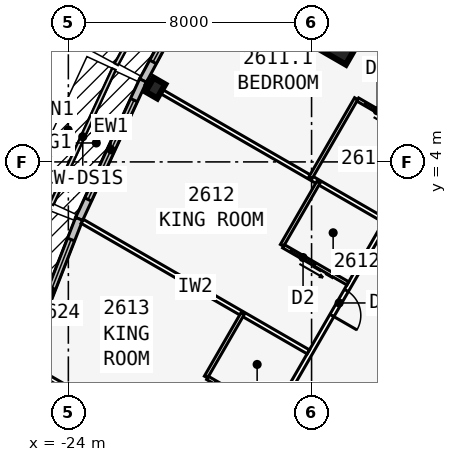
"""IFC4 building model, lengths in metres.
Left out: names, types, materials, properties, quantities, classifications, styles, units other than length and angle.
Written with IfcOpenShell. Run it as: python <this file> out.ifc"""

import sys

from ifc_helpers import new_model, si_unit, direction, frame, frame_2d, origin, origin_2d, place, context, subcontext, project, spatial, rectangle, i_section, extrude, element, fill, save


model = new_model("IFC4")
c1 = context("Model", 3, precision=1e-05, world=origin(), true_north=direction((0.0, 1.0)))
c2 = subcontext(c1, "Body", "Model", "MODEL_VIEW")
j1 = project(units=[si_unit("LENGTHUNIT", "METRE"), si_unit("PLANEANGLEUNIT", "RADIAN")], contexts=[c1])
p1 = place(None, origin())
s1 = spatial("IfcSite", under=j1, at=p1, CompositionType="ELEMENT")
p2 = place(p1, origin())
s2 = spatial("IfcBuilding", under=s1, at=p2, CompositionType="ELEMENT")
p3 = place(p2, frame((0.0, 0.0, 99.9)))
s3 = spatial("IfcBuildingStorey", under=s2, at=p3, CompositionType="ELEMENT", Elevation=99.9)
p4 = place(p3, frame((0.0, 19.052, 0.0), z_axis=(0.0, 0.0, 1.0), x_axis=(-0.499999749417, -0.866025548458, 0.0)))
e1 = element("IfcWall", 1, at=p4, inside=s3, PredefinedType="SHEAR", context=c2, shape_type="SweptSolid", body=[
    extrude(rectangle(XDim=33.0, YDim=0.9, at=frame_2d((16.5, 0.0))), origin(), (0.0, 0.0, 1.0), 3.4),
])
p5 = place(p4, frame((14.15, 0.0, 0.0)))
e2 = element("IfcOpeningElement", 2, at=p5, cuts=e1, PredefinedType="OPENING", context=c2, shape_type="SweptSolid", body=[
    extrude(rectangle(XDim=1.8, YDim=2.13, at=frame_2d((0.9, 1.065))), frame((0.0, 0.46, 0.0), z_axis=(0.0, -1.0, 0.0), x_axis=(1.0, 0.0, 0.0)), (0.0, 0.0, 1.0), 0.92),
])
p6 = place(p4, frame((12.6, 0.0, 0.0)))
e3 = element("IfcOpeningElement", 3, at=p6, cuts=e1, PredefinedType="OPENING", context=c2, shape_type="SweptSolid", body=[
    extrude(rectangle(XDim=1.0, YDim=2.13, at=frame_2d((0.5, 1.065))), frame((0.0, 0.46, 0.0), z_axis=(0.0, -1.0, 0.0), x_axis=(1.0, 0.0, 0.0)), (0.0, 0.0, 1.0), 0.92),
])
p7 = place(p3, frame((-21.137, 6.43, 0.0), z_axis=(0.0, 0.0, 1.0), x_axis=(-0.866025403784, 0.5, 0.0)))
e4 = element("IfcColumn", 4, at=p7, inside=s3, PredefinedType="COLUMN", context=c2, shape_type="SweptSolid", body=[
    extrude(i_section(OverallWidth=0.442, OverallDepth=0.531, WebThickness=0.066, FlangeThickness=0.106, at=origin_2d()), origin(), (0.0, 0.0, 1.0), 3.4),
])
p8 = place(p3, frame((-15.312, 8.84, 0.0), z_axis=(0.0, 0.0, 1.0), x_axis=(-0.866025403784, 0.5, 0.0)))
e5 = element("IfcColumn", 5, at=p8, inside=s3, PredefinedType="COLUMN", context=c2, shape_type="SweptSolid", body=[
    extrude(rectangle(XDim=2.4, YDim=2.4, at=origin_2d()), origin(), (0.0, 0.0, 1.0), 3.4),
])
p9 = place(p3, frame((-19.178, 11.077, 0.0), z_axis=(0.0, 0.0, 1.0), x_axis=(-0.473412820489, -0.880840678782, 0.0)))
e6 = element("IfcWall", 6, at=p9, inside=s3, PredefinedType="STANDARD", context=c2, shape_type="SweptSolid", body=[
    extrude(rectangle(XDim=5.002, YDim=0.25, at=frame_2d((2.501, 0.0))), origin(), (0.0, 0.0, 1.0), 3.15),
])
p10 = place(p9, frame((0.701, 0.0, 0.45)))
e7 = element("IfcOpeningElement", 7, at=p10, cuts=e6, PredefinedType="OPENING", context=c2, shape_type="SweptSolid", body=[
    extrude(rectangle(XDim=3.6, YDim=2.4, at=frame_2d((1.8, 1.2))), frame((0.0, 0.135, 0.0), z_axis=(0.0, -1.0, 0.0), x_axis=(1.0, 0.0, 0.0)), (0.0, 0.0, 1.0), 0.27),
])
p11 = place(p3, frame((-21.543, 6.678, 0.0), z_axis=(0.0, 0.0, 1.0), x_axis=(-0.419203100754, -0.907892482796, 0.0)))
e8 = element("IfcWall", 8, at=p11, inside=s3, PredefinedType="STANDARD", context=c2, shape_type="SweptSolid", body=[
    extrude(rectangle(XDim=5.021, YDim=0.25, at=frame_2d((2.51, 0.0))), origin(), (0.0, 0.0, 1.0), 3.15),
])
p12 = place(p11, frame((0.71, 0.0, 0.45)))
e9 = element("IfcOpeningElement", 9, at=p12, cuts=e8, PredefinedType="OPENING", context=c2, shape_type="SweptSolid", body=[
    extrude(rectangle(XDim=3.6, YDim=2.4, at=frame_2d((1.8, 1.2))), frame((0.0, 0.135, 0.0), z_axis=(0.0, -1.0, 0.0), x_axis=(1.0, 0.0, 0.0)), (0.0, 0.0, 1.0), 0.27),
])
p13 = place(p3, frame((-23.645, 2.126, 0.0), z_axis=(0.0, 0.0, 1.0), x_axis=(-0.364013463868, -0.931393685894, 0.0)))
e10 = element("IfcWall", 10, at=p13, inside=s3, PredefinedType="STANDARD", context=c2, shape_type="SweptSolid", body=[
    extrude(rectangle(XDim=5.058, YDim=0.25, at=frame_2d((2.529, 0.0))), origin(), (0.0, 0.0, 1.0), 3.15),
])
p14 = place(p13, frame((0.729, 0.0, 0.45)))
e11 = element("IfcOpeningElement", 11, at=p14, cuts=e10, PredefinedType="OPENING", context=c2, shape_type="SweptSolid", body=[
    extrude(rectangle(XDim=3.6, YDim=2.4, at=frame_2d((1.8, 1.2))), frame((0.0, 0.135, 0.0), z_axis=(0.0, -1.0, 0.0), x_axis=(1.0, 0.0, 0.0)), (0.0, 0.0, 1.0), 0.27),
])
p15 = place(p3, frame((-0.5, 24.636, 0.0), z_axis=(0.0, 0.0, 1.0), x_axis=(-0.500001915564, -0.86602429783, 0.0)))
e12 = element("IfcWall", 12, at=p15, inside=s3, PredefinedType="PARTITIONING", context=c2, shape_type="SweptSolid", body=[
    extrude(rectangle(XDim=42.172, YDim=0.15, at=frame_2d((21.086, 0.0))), origin(), (0.0, 0.0, 1.0), 3.15),
])
p16 = place(p15, frame((1.911, 0.0, 0.0)))
e13 = element("IfcOpeningElement", 13, at=p16, cuts=e12, PredefinedType="OPENING", context=c2, shape_type="SweptSolid", body=[
    extrude(rectangle(XDim=0.95, YDim=2.13, at=frame_2d((0.475, 1.065))), frame((0.0, 0.085, 0.0), z_axis=(0.0, -1.0, 0.0), x_axis=(1.0, 0.0, 0.0)), (0.0, 0.0, 1.0), 0.17),
])
p17 = place(p15, frame((8.111, 0.0, 0.0)))
e14 = element("IfcOpeningElement", 14, at=p17, cuts=e12, PredefinedType="OPENING", context=c2, shape_type="SweptSolid", body=[
    extrude(rectangle(XDim=0.95, YDim=2.13, at=frame_2d((0.475, 1.065))), frame((0.0, 0.085, 0.0), z_axis=(0.0, -1.0, 0.0), x_axis=(1.0, 0.0, 0.0)), (0.0, 0.0, 1.0), 0.17),
])
p18 = place(p15, frame((18.111, 0.0, 0.0)))
e15 = element("IfcOpeningElement", 15, at=p18, cuts=e12, PredefinedType="OPENING", context=c2, shape_type="SweptSolid", body=[
    extrude(rectangle(XDim=0.95, YDim=2.13, at=frame_2d((0.475, 1.065))), frame((0.0, 0.085, 0.0), z_axis=(0.0, -1.0, 0.0), x_axis=(1.0, 0.0, 0.0)), (0.0, 0.0, 1.0), 0.17),
])
p19 = place(p15, frame((28.711, 0.0, 0.0)))
e16 = element("IfcOpeningElement", 16, at=p19, cuts=e12, PredefinedType="OPENING", context=c2, shape_type="SweptSolid", body=[
    extrude(rectangle(XDim=0.95, YDim=2.13, at=frame_2d((0.475, 1.065))), frame((0.0, 0.085, 0.0), z_axis=(0.0, -1.0, 0.0), x_axis=(1.0, 0.0, 0.0)), (0.0, 0.0, 1.0), 0.17),
])
p20 = place(p15, frame((33.711, 0.0, 0.0)))
e17 = element("IfcOpeningElement", 17, at=p20, cuts=e12, PredefinedType="OPENING", context=c2, shape_type="SweptSolid", body=[
    extrude(rectangle(XDim=0.95, YDim=2.13, at=frame_2d((0.475, 1.065))), frame((0.0, 0.085, 0.0), z_axis=(0.0, -1.0, 0.0), x_axis=(1.0, 0.0, 0.0)), (0.0, 0.0, 1.0), 0.17),
])
p21 = place(p15, frame((39.311, 0.0, 0.0)))
e18 = element("IfcOpeningElement", 18, at=p21, cuts=e12, PredefinedType="OPENING", context=c2, shape_type="SweptSolid", body=[
    extrude(rectangle(XDim=0.95, YDim=2.13, at=frame_2d((0.475, 1.065))), frame((0.0, 0.085, 0.0), z_axis=(0.0, -1.0, 0.0), x_axis=(1.0, 0.0, 0.0)), (0.0, 0.0, 1.0), 0.17),
])
p22 = place(p3, frame((-11.108, 6.413, 0.0), z_axis=(0.0, 0.0, 1.0), x_axis=(-0.866022450903, 0.500005114506, 0.0)))
e19 = element("IfcWall", 19, at=p22, inside=s3, PredefinedType="PARTITIONING", context=c2, shape_type="SweptSolid", body=[
    extrude(rectangle(XDim=9.196, YDim=0.1, at=frame_2d((4.598, 0.0))), origin(), (0.0, 0.0, 1.0), 2.109),
])
p23 = place(p22, frame((0.45, 0.0, 0.0)))
e20 = element("IfcOpeningElement", 20, at=p23, cuts=e19, PredefinedType="OPENING", context=c2, shape_type="SweptSolid", body=[
    extrude(rectangle(XDim=0.9, YDim=2.032, at=frame_2d((0.45, 1.016))), frame((0.0, 0.06, 0.0), z_axis=(0.0, -1.0, 0.0), x_axis=(1.0, 0.0, 0.0)), (0.0, 0.0, 1.0), 0.12),
])
p24 = place(p3, frame((-13.608, 2.083, 0.0), z_axis=(0.0, 0.0, 1.0), x_axis=(-0.866028232062, 0.499995101247, 0.0)))
e21 = element("IfcWall", 21, at=p24, inside=s3, PredefinedType="PARTITIONING", context=c2, shape_type="SweptSolid", body=[
    extrude(rectangle(XDim=9.043, YDim=0.15, at=frame_2d((4.521, 0.0))), origin(), (0.0, 0.0, 1.0), 2.05),
])
p25 = place(p3, frame((-16.108, -2.247, 0.0), z_axis=(0.0, 0.0, 1.0), x_axis=(-0.866018881988, 0.500011295912, 0.0)))
e22 = element("IfcWall", 22, at=p25, inside=s3, PredefinedType="PARTITIONING", context=c2, shape_type="SweptSolid", body=[
    extrude(rectangle(XDim=8.585, YDim=0.15, at=frame_2d((4.292, 0.0))), origin(), (0.0, 0.0, 1.0), 2.109),
])
p26 = place(p3, frame((-18.608, -6.577, 0.0), z_axis=(0.0, 0.0, 1.0), x_axis=(-0.866034818847, 0.499983692279, 0.0)))
e23 = element("IfcWall", 23, at=p26, inside=s3, PredefinedType="PARTITIONING", context=c2, shape_type="SweptSolid", body=[
    extrude(rectangle(XDim=7.82, YDim=0.15, at=frame_2d((3.91, 0.0))), origin(), (0.0, 0.0, 1.0), 2.05),
])
p27 = place(p3, frame((-14.533, 6.081, 0.0), z_axis=(0.0, 0.0, 1.0), x_axis=(-0.499990139034, -0.866031096941, 0.0)))
e24 = element("IfcWall", 24, at=p27, inside=s3, PredefinedType="PLUMBINGWALL", context=c2, shape_type="SweptSolid", body=[
    extrude(rectangle(XDim=3.0, YDim=0.12, at=frame_2d((1.5, 0.0))), origin(), (0.0, 0.0, 1.0), 3.15),
])
p28 = place(p3, frame((-12.108, 4.681, 0.0), z_axis=(0.0, 0.0, 1.0), x_axis=(-0.866035715982, 0.499982138324, 0.0)))
e25 = element("IfcWall", 25, at=p28, inside=s3, PredefinedType="PLUMBINGWALL", context=c2, shape_type="SweptSolid", body=[
    extrude(rectangle(XDim=2.74, YDim=0.12, at=frame_2d((1.37, 0.0))), origin(), (0.0, 0.0, 1.0), 3.15),
])
p29 = place(p28, frame((1.55, 0.0, 0.0)))
e26 = element("IfcOpeningElement", 26, at=p29, cuts=e25, PredefinedType="OPENING", context=c2, shape_type="SweptSolid", body=[
    extrude(rectangle(XDim=0.9, YDim=2.13, at=frame_2d((0.45, 1.065))), frame((0.0, 0.07, 0.0), z_axis=(0.0, -1.0, 0.0), x_axis=(1.0, 0.0, 0.0)), (0.0, 0.0, 1.0), 0.14),
])
p30 = place(p3, frame((-15.773, 3.333, 0.0), z_axis=(0.0, 0.0, 1.0), x_axis=(-0.500001309137, -0.866024647952, 0.0)))
e27 = element("IfcWall", 27, at=p30, inside=s3, PredefinedType="PLUMBINGWALL", context=c2, shape_type="SweptSolid", body=[
    extrude(rectangle(XDim=2.4, YDim=0.12, at=frame_2d((1.2, 0.0))), origin(), (0.0, 0.0, 1.0), 3.15),
])
p31 = place(p3, frame((-14.808, 0.005, 0.0), z_axis=(0.0, 0.0, 1.0), x_axis=(-0.866023955769, 0.500002508028, 0.0)))
e28 = element("IfcWall", 28, at=p31, inside=s3, PredefinedType="PLUMBINGWALL", context=c2, shape_type="SweptSolid", body=[
    extrude(rectangle(XDim=2.44, YDim=0.12, at=frame_2d((1.22, 0.0))), origin(), (0.0, 0.0, 1.0), 3.15),
])
p32 = place(p31, frame((1.25, 0.0, 0.0)))
e29 = element("IfcOpeningElement", 29, at=p32, cuts=e28, PredefinedType="OPENING", context=c2, shape_type="SweptSolid", body=[
    extrude(rectangle(XDim=0.9, YDim=2.13, at=frame_2d((0.45, 1.065))), frame((0.0, 0.07, 0.0), z_axis=(0.0, -1.0, 0.0), x_axis=(1.0, 0.0, 0.0)), (0.0, 0.0, 1.0), 0.14),
])
p33 = place(p3, frame((-18.273, -0.997, 0.0), z_axis=(0.0, 0.0, 1.0), x_axis=(-0.499957262057, -0.866050077142, 0.0)))
e30 = element("IfcWall", 30, at=p33, inside=s3, PredefinedType="PLUMBINGWALL", context=c2, shape_type="SweptSolid", body=[
    extrude(rectangle(XDim=2.4, YDim=0.12, at=frame_2d((1.2, 0.0))), origin(), (0.0, 0.0, 1.0), 3.15),
])
p34 = place(p3, frame((-17.308, -4.326, 0.0), z_axis=(0.0, 0.0, 1.0), x_axis=(-0.866023955769, 0.500002508028, 0.0)))
e31 = element("IfcWall", 31, at=p34, inside=s3, PredefinedType="PLUMBINGWALL", context=c2, shape_type="SweptSolid", body=[
    extrude(rectangle(XDim=2.44, YDim=0.12, at=frame_2d((1.22, 0.0))), origin(), (0.0, 0.0, 1.0), 3.15),
])
p35 = place(p34, frame((1.25, 0.0, 0.0)))
e32 = element("IfcOpeningElement", 32, at=p35, cuts=e31, PredefinedType="OPENING", context=c2, shape_type="SweptSolid", body=[
    extrude(rectangle(XDim=0.9, YDim=2.13, at=frame_2d((0.45, 1.065))), frame((0.0, 0.07, 0.0), z_axis=(0.0, -1.0, 0.0), x_axis=(1.0, 0.0, 0.0)), (0.0, 0.0, 1.0), 0.14),
])
p36 = place(p10, origin())
e33 = element("IfcWindow", 33, at=p36, inside=s3, PartitioningType="SINGLE_PANEL", PredefinedType="WINDOW", context=c2, shape_type="SweptSolid", body=[
    extrude(rectangle(XDim=3.6, YDim=2.4, at=frame_2d((1.8, 1.2))), frame((0.0, 0.03, 0.0), z_axis=(0.0, -1.0, 0.0), x_axis=(1.0, 0.0, 0.0)), (0.0, 0.0, 1.0), 0.06),
])
fill(e7, e33)
p37 = place(p12, origin())
e34 = element("IfcWindow", 34, at=p37, inside=s3, PartitioningType="SINGLE_PANEL", PredefinedType="WINDOW", context=c2, shape_type="SweptSolid", body=[
    extrude(rectangle(XDim=3.6, YDim=2.4, at=frame_2d((1.8, 1.2))), frame((0.0, 0.03, 0.0), z_axis=(0.0, -1.0, 0.0), x_axis=(1.0, 0.0, 0.0)), (0.0, 0.0, 1.0), 0.06),
])
fill(e9, e34)
p38 = place(p14, origin())
e35 = element("IfcWindow", 35, at=p38, inside=s3, PartitioningType="SINGLE_PANEL", PredefinedType="WINDOW", context=c2, shape_type="SweptSolid", body=[
    extrude(rectangle(XDim=3.6, YDim=2.4, at=frame_2d((1.8, 1.2))), frame((0.0, 0.03, 0.0), z_axis=(0.0, -1.0, 0.0), x_axis=(1.0, 0.0, 0.0)), (0.0, 0.0, 1.0), 0.06),
])
fill(e11, e35)
p39 = place(p29, origin())
e36 = element("IfcDoor", 36, at=p39, inside=s3, OperationType="SLIDING_TO_LEFT", PredefinedType="DOOR", context=c2, shape_type="SweptSolid", body=[
    extrude(rectangle(XDim=0.9, YDim=2.13, at=frame_2d((0.45, 1.065))), frame((0.0, 0.025, 0.0), z_axis=(0.0, -1.0, 0.0), x_axis=(1.0, 0.0, 0.0)), (0.0, 0.0, 1.0), 0.05),
])
fill(e26, e36)
p40 = place(p32, origin())
e37 = element("IfcDoor", 37, at=p40, inside=s3, OperationType="SLIDING_TO_LEFT", PredefinedType="DOOR", context=c2, shape_type="SweptSolid", body=[
    extrude(rectangle(XDim=0.9, YDim=2.13, at=frame_2d((0.45, 1.065))), frame((0.0, 0.025, 0.0), z_axis=(0.0, -1.0, 0.0), x_axis=(1.0, 0.0, 0.0)), (0.0, 0.0, 1.0), 0.05),
])
fill(e29, e37)
p41 = place(p19, origin())
e38 = element("IfcDoor", 38, at=p41, inside=s3, OperationType="SINGLE_SWING_RIGHT", PredefinedType="DOOR", context=c2, shape_type="SweptSolid", body=[
    extrude(rectangle(XDim=0.95, YDim=2.13, at=frame_2d((0.475, 1.065))), frame((0.0, 0.025, 0.0), z_axis=(0.0, -1.0, 0.0), x_axis=(1.0, 0.0, 0.0)), (0.0, 0.0, 1.0), 0.05),
])
fill(e16, e38)
p42 = place(p35, origin())
e39 = element("IfcDoor", 39, at=p42, inside=s3, OperationType="SLIDING_TO_LEFT", PredefinedType="DOOR", context=c2, shape_type="SweptSolid", body=[
    extrude(rectangle(XDim=0.9, YDim=2.13, at=frame_2d((0.45, 1.065))), frame((0.0, 0.025, 0.0), z_axis=(0.0, -1.0, 0.0), x_axis=(1.0, 0.0, 0.0)), (0.0, 0.0, 1.0), 0.05),
])
fill(e32, e39)
save(model, sys.argv[1])
